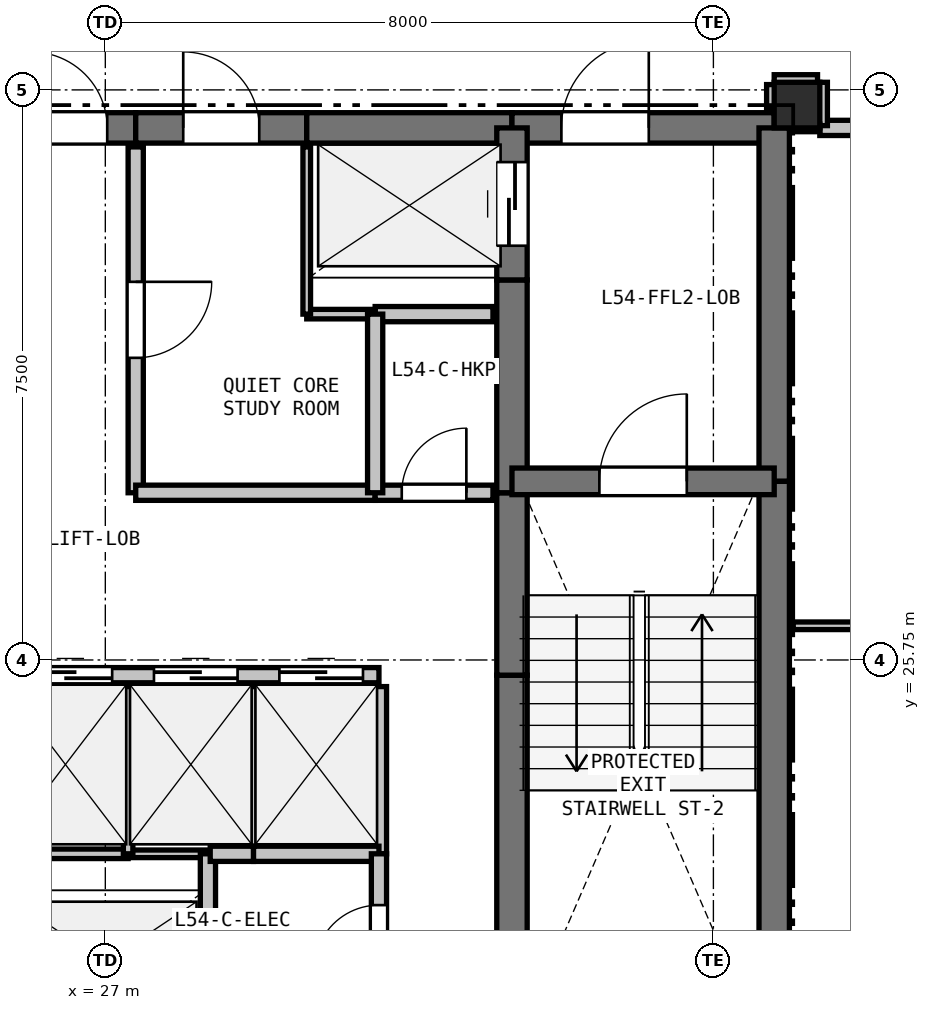
"""IFC4 building model, lengths in metres.
Left out: names, types, materials, properties, quantities, classifications, styles, units other than length and angle.
Written with IfcOpenShell. Run it as: python <this file> out.ifc"""

import sys

from ifc_helpers import new_model, si_unit, direction, frame, frame_2d, origin, origin_2d, place, context, subcontext, project, spatial, rectangle, extrude, element, fill, save


model = new_model("IFC4")
c1 = context("Model", 3, precision=1e-05, world=origin(), true_north=direction((0.0, 1.0)))
c2 = subcontext(c1, "Body", "Model", "MODEL_VIEW")
j1 = project(units=[si_unit("LENGTHUNIT", "METRE"), si_unit("PLANEANGLEUNIT", "RADIAN")], contexts=[c1])
p1 = place(None, origin())
s1 = spatial("IfcSite", under=j1, at=p1, CompositionType="ELEMENT")
p2 = place(p1, origin())
s2 = spatial("IfcBuilding", under=s1, at=p2, CompositionType="ELEMENT")
p3 = place(p2, frame((0.0, 0.0, 195.3)))
s3 = spatial("IfcBuildingStorey", under=s2, at=p3, CompositionType="ELEMENT", Elevation=195.3)
p4 = place(p3, frame((36.1, 33.05, 0.0), z_axis=(0.0, 0.0, 1.0), x_axis=(1.0, 0.0, 0.0)))
e1 = element("IfcColumn", 1, at=p4, inside=s3, PredefinedType="COLUMN", context=c2, shape_type="SweptSolid", body=[
    extrude(rectangle(XDim=0.6, YDim=0.6, at=origin_2d()), origin(), (0.0, 0.0, 1.0), 3.3),
])
p5 = place(p3, frame((25.65, 32.75, 0.0), z_axis=(0.0, 0.0, 1.0), x_axis=(1.0, 0.0, 0.0)))
e2 = element("IfcWall", 2, at=p5, inside=s3, PredefinedType="SHEAR", context=c2, shape_type="SweptSolid", body=[
    extrude(rectangle(XDim=1.75, YDim=0.4, at=frame_2d((0.875, 0.0))), origin(), (0.0, 0.0, 1.0), 3.07),
])
p6 = place(p5, frame((0.375, 0.0, 0.0)))
e3 = element("IfcOpeningElement", 3, at=p6, cuts=e2, PredefinedType="OPENING", context=c2, shape_type="SweptSolid", body=[
    extrude(rectangle(XDim=1.0, YDim=2.15, at=frame_2d((0.5, 1.075))), frame((0.0, 0.21, 0.0), z_axis=(0.0, -1.0, 0.0), x_axis=(1.0, 0.0, 0.0)), (0.0, 0.0, 1.0), 0.42),
])
p7 = place(p3, frame((27.4, 32.75, 0.0), z_axis=(0.0, 0.0, 1.0), x_axis=(1.0, 0.0, 0.0)))
e4 = element("IfcWall", 4, at=p7, inside=s3, PredefinedType="SHEAR", context=c2, shape_type="SweptSolid", body=[
    extrude(rectangle(XDim=2.25, YDim=0.4, at=frame_2d((1.125, 0.0))), origin(), (0.0, 0.0, 1.0), 3.07),
])
p8 = place(p7, frame((0.625, 0.0, 0.0)))
e5 = element("IfcOpeningElement", 5, at=p8, cuts=e4, PredefinedType="OPENING", context=c2, shape_type="SweptSolid", body=[
    extrude(rectangle(XDim=1.0, YDim=2.15, at=frame_2d((0.5, 1.075))), frame((0.0, 0.21, 0.0), z_axis=(0.0, -1.0, 0.0), x_axis=(1.0, 0.0, 0.0)), (0.0, 0.0, 1.0), 0.42),
])
p9 = place(p3, frame((29.65, 32.75, 0.0), z_axis=(0.0, 0.0, 1.0), x_axis=(1.0, 0.0, 0.0)))
e6 = element("IfcWall", 6, at=p9, inside=s3, PredefinedType="SHEAR", context=c2, shape_type="SweptSolid", body=[
    extrude(rectangle(XDim=2.7, YDim=0.4, at=frame_2d((1.35, 0.0))), origin(), (0.0, 0.0, 1.0), 3.07),
])
p10 = place(p3, frame((32.35, 32.75, 0.0), z_axis=(0.0, 0.0, 1.0), x_axis=(1.0, 0.0, 0.0)))
e7 = element("IfcWall", 7, at=p10, inside=s3, PredefinedType="SHEAR", context=c2, shape_type="SweptSolid", body=[
    extrude(rectangle(XDim=3.45, YDim=0.4, at=frame_2d((1.725, 0.0))), origin(), (0.0, 0.0, 1.0), 3.07),
])
p11 = place(p10, frame((0.65, 0.0, 0.0)))
e8 = element("IfcOpeningElement", 8, at=p11, cuts=e7, PredefinedType="OPENING", context=c2, shape_type="SweptSolid", body=[
    extrude(rectangle(XDim=1.15, YDim=2.15, at=frame_2d((0.575, 1.075))), frame((0.0, 0.21, 0.0), z_axis=(0.0, -1.0, 0.0), x_axis=(1.0, 0.0, 0.0)), (0.0, 0.0, 1.0), 0.42),
])
p12 = place(p3, frame((35.8, 32.75, 0.0), z_axis=(0.0, 0.0, 1.0), x_axis=(0.0, -1.0, 0.0)))
e9 = element("IfcWall", 9, at=p12, inside=s3, PredefinedType="SHEAR", context=c2, shape_type="SweptSolid", body=[
    extrude(rectangle(XDim=4.65, YDim=0.4, at=frame_2d((2.325, 0.0))), origin(), (0.0, 0.0, 1.0), 3.07),
])
p13 = place(p3, frame((35.8, 28.1, 0.0), z_axis=(0.0, 0.0, 1.0), x_axis=(0.0, -1.0, 0.0)))
e10 = element("IfcWall", 10, at=p13, inside=s3, PredefinedType="SHEAR", context=c2, shape_type="SweptSolid", body=[
    extrude(rectangle(XDim=7.35, YDim=0.4, at=frame_2d((3.675, 0.0))), origin(), (0.0, 0.0, 1.0), 3.07),
])
p14 = place(p3, frame((32.35, 20.75, 0.0), z_axis=(0.0, 0.0, 1.0), x_axis=(0.0, 1.0, 0.0)))
e11 = element("IfcWall", 11, at=p14, inside=s3, PredefinedType="SHEAR", context=c2, shape_type="SweptSolid", body=[
    extrude(rectangle(XDim=4.8, YDim=0.4, at=frame_2d((2.4, 0.0))), origin(), (0.0, 0.0, 1.0), 3.07),
])
p15 = place(p3, frame((32.35, 25.55, 0.0), z_axis=(0.0, 0.0, 1.0), x_axis=(0.0, 1.0, 0.0)))
e12 = element("IfcWall", 12, at=p15, inside=s3, PredefinedType="SHEAR", context=c2, shape_type="SweptSolid", body=[
    extrude(rectangle(XDim=2.4, YDim=0.4, at=frame_2d((1.2, 0.0))), origin(), (0.0, 0.0, 1.0), 3.07),
])
p16 = place(p3, frame((32.35, 27.95, 0.0), z_axis=(0.0, 0.0, 1.0), x_axis=(0.0, 1.0, 0.0)))
e13 = element("IfcWall", 13, at=p16, inside=s3, PredefinedType="SHEAR", context=c2, shape_type="SweptSolid", body=[
    extrude(rectangle(XDim=2.8, YDim=0.4, at=frame_2d((1.4, 0.0))), origin(), (0.0, 0.0, 1.0), 3.07),
])
p17 = place(p3, frame((32.35, 30.75, 0.0), z_axis=(0.0, 0.0, 1.0), x_axis=(0.0, 1.0, 0.0)))
e14 = element("IfcWall", 14, at=p17, inside=s3, PredefinedType="SHEAR", context=c2, shape_type="SweptSolid", body=[
    extrude(rectangle(XDim=2.0, YDim=0.4, at=frame_2d((1.0, 0.0))), origin(), (0.0, 0.0, 1.0), 3.07),
])
p18 = place(p17, frame((0.45, 0.0, 0.0)))
e15 = element("IfcOpeningElement", 15, at=p18, cuts=e14, PredefinedType="OPENING", context=c2, shape_type="SweptSolid", body=[
    extrude(rectangle(XDim=1.1, YDim=2.15, at=frame_2d((0.55, 1.075))), frame((0.0, 0.21, 0.0), z_axis=(0.0, -1.0, 0.0), x_axis=(1.0, 0.0, 0.0)), (0.0, 0.0, 1.0), 0.42),
])
p19 = place(p3, frame((32.35, 28.1, 0.0), z_axis=(0.0, 0.0, 1.0), x_axis=(1.0, 0.0, 0.0)))
e16 = element("IfcWall", 16, at=p19, inside=s3, PredefinedType="SHEAR", context=c2, shape_type="SweptSolid", body=[
    extrude(rectangle(XDim=3.45, YDim=0.35, at=frame_2d((1.725, 0.0))), origin(), (0.0, 0.0, 1.0), 3.07),
])
p20 = place(p19, frame((1.15, 0.0, 0.0)))
e17 = element("IfcOpeningElement", 17, at=p20, cuts=e16, PredefinedType="OPENING", context=c2, shape_type="SweptSolid", body=[
    extrude(rectangle(XDim=1.15, YDim=2.15, at=frame_2d((0.575, 1.075))), frame((0.0, 0.185, 0.0), z_axis=(0.0, -1.0, 0.0), x_axis=(1.0, 0.0, 0.0)), (0.0, 0.0, 1.0), 0.37),
])
p21 = place(p3, frame((25.65, 25.55, 0.0), z_axis=(0.0, 0.0, 1.0), x_axis=(1.0, 0.0, 0.0)))
e18 = element("IfcWall", 18, at=p21, inside=s3, PredefinedType="PARTITIONING", context=c2, shape_type="SweptSolid", body=[
    extrude(rectangle(XDim=4.95, YDim=0.2, at=frame_2d((2.475, 0.0))), origin(), (0.0, 0.0, 1.0), 3.07),
])
p22 = place(p21, frame((0.34, 0.0, 0.0)))
e19 = element("IfcOpeningElement", 19, at=p22, cuts=e18, PredefinedType="OPENING", context=c2, shape_type="SweptSolid", body=[
    extrude(rectangle(XDim=1.1, YDim=2.15, at=frame_2d((0.55, 1.075))), frame((0.0, 0.11, 0.0), z_axis=(0.0, -1.0, 0.0), x_axis=(1.0, 0.0, 0.0)), (0.0, 0.0, 1.0), 0.22),
])
p23 = place(p21, frame((1.99, 0.0, 0.0)))
e20 = element("IfcOpeningElement", 20, at=p23, cuts=e18, PredefinedType="OPENING", context=c2, shape_type="SweptSolid", body=[
    extrude(rectangle(XDim=1.1, YDim=2.15, at=frame_2d((0.55, 1.075))), frame((0.0, 0.11, 0.0), z_axis=(0.0, -1.0, 0.0), x_axis=(1.0, 0.0, 0.0)), (0.0, 0.0, 1.0), 0.22),
])
p24 = place(p21, frame((3.64, 0.0, 0.0)))
e21 = element("IfcOpeningElement", 21, at=p24, cuts=e18, PredefinedType="OPENING", context=c2, shape_type="SweptSolid", body=[
    extrude(rectangle(XDim=1.1, YDim=2.15, at=frame_2d((0.55, 1.075))), frame((0.0, 0.11, 0.0), z_axis=(0.0, -1.0, 0.0), x_axis=(1.0, 0.0, 0.0)), (0.0, 0.0, 1.0), 0.22),
])
p25 = place(p3, frame((25.9, 23.2, 0.0), z_axis=(0.0, 0.0, 1.0), x_axis=(1.0, 0.0, 0.0)))
e22 = element("IfcWall", 22, at=p25, inside=s3, PredefinedType="PARTITIONING", context=c2, shape_type="SweptSolid", body=[
    extrude(rectangle(XDim=1.4, YDim=0.125, at=frame_2d((0.7, 0.0))), origin(), (0.0, 0.0, 1.0), 3.07),
])
p26 = place(p3, frame((27.3, 23.2, 0.0), z_axis=(0.0, 0.0, 1.0), x_axis=(1.0, 0.0, 0.0)))
e23 = element("IfcWall", 23, at=p26, inside=s3, PredefinedType="PARTITIONING", context=c2, shape_type="SweptSolid", body=[
    extrude(rectangle(XDim=1.05, YDim=0.1, at=frame_2d((0.525, 0.0))), origin(), (0.0, 0.0, 1.0), 3.07),
])
p27 = place(p3, frame((28.35, 23.2, 0.0), z_axis=(0.0, 0.0, 1.0), x_axis=(0.0, -1.0, 0.0)))
e24 = element("IfcWall", 24, at=p27, inside=s3, PredefinedType="PARTITIONING", context=c2, shape_type="SweptSolid", body=[
    extrude(rectangle(XDim=2.2, YDim=0.2, at=frame_2d((1.1, 0.0))), origin(), (0.0, 0.0, 1.0), 3.07),
])
p28 = place(p3, frame((32.1, 30.3, 0.0), z_axis=(0.0, 0.0, 1.0), x_axis=(-1.0, 0.0, 0.0)))
e25 = element("IfcWall", 25, at=p28, inside=s3, PredefinedType="PARTITIONING", context=c2, shape_type="SweptSolid", body=[
    extrude(rectangle(XDim=1.55, YDim=0.2, at=frame_2d((0.775, 0.0))), origin(), (0.0, 0.0, 1.0), 3.07),
])
p29 = place(p3, frame((30.55, 30.3, 0.0), z_axis=(0.0, 0.0, 1.0), x_axis=(-1.0, 0.0, 0.0)))
e26 = element("IfcWall", 26, at=p29, inside=s3, PredefinedType="PARTITIONING", context=c2, shape_type="SweptSolid", body=[
    extrude(rectangle(XDim=0.9, YDim=0.125, at=frame_2d((0.45, 0.0))), origin(), (0.0, 0.0, 1.0), 3.07),
])
p30 = place(p3, frame((29.65, 30.3, 0.0), z_axis=(0.0, 0.0, 1.0), x_axis=(0.0, 1.0, 0.0)))
e27 = element("IfcWall", 27, at=p30, inside=s3, PredefinedType="PARTITIONING", context=c2, shape_type="SweptSolid", body=[
    extrude(rectangle(XDim=2.2, YDim=0.1, at=frame_2d((1.1, 0.0))), origin(), (0.0, 0.0, 1.0), 3.07),
])
p31 = place(p3, frame((27.3, 25.4, 0.0), z_axis=(0.0, 0.0, 1.0), x_axis=(0.0, -1.0, 0.0)))
e28 = element("IfcWall", 28, at=p31, inside=s3, PredefinedType="PARTITIONING", context=c2, shape_type="SweptSolid", body=[
    extrude(rectangle(XDim=2.2, YDim=0.125, at=frame_2d((1.1, 0.0))), origin(), (0.0, 0.0, 1.0), 3.07),
])
p32 = place(p3, frame((28.95, 25.4, 0.0), z_axis=(0.0, 0.0, 1.0), x_axis=(0.0, -1.0, 0.0)))
e29 = element("IfcWall", 29, at=p32, inside=s3, PredefinedType="PARTITIONING", context=c2, shape_type="SweptSolid", body=[
    extrude(rectangle(XDim=2.2, YDim=0.1, at=frame_2d((1.1, 0.0))), origin(), (0.0, 0.0, 1.0), 3.07),
])
p33 = place(p3, frame((28.95, 23.2, 0.0), z_axis=(0.0, 0.0, 1.0), x_axis=(-1.0, 0.0, 0.0)))
e30 = element("IfcWall", 30, at=p33, inside=s3, PredefinedType="PARTITIONING", context=c2, shape_type="SweptSolid", body=[
    extrude(rectangle(XDim=0.57, YDim=0.2, at=frame_2d((0.285, 0.0))), origin(), (0.0, 0.0, 1.0), 3.07),
])
p34 = place(p3, frame((30.6, 25.4, 0.0), z_axis=(0.0, 0.0, 1.0), x_axis=(0.0, -1.0, 0.0)))
e31 = element("IfcWall", 31, at=p34, inside=s3, PredefinedType="PARTITIONING", context=c2, shape_type="SweptSolid", body=[
    extrude(rectangle(XDim=2.2, YDim=0.2, at=frame_2d((1.1, 0.0))), origin(), (0.0, 0.0, 1.0), 3.07),
])
p35 = place(p3, frame((30.6, 23.2, 0.0), z_axis=(0.0, 0.0, 1.0), x_axis=(-1.0, 0.0, 0.0)))
e32 = element("IfcWall", 32, at=p35, inside=s3, PredefinedType="PARTITIONING", context=c2, shape_type="SweptSolid", body=[
    extrude(rectangle(XDim=1.65, YDim=0.2, at=frame_2d((0.825, 0.0))), origin(), (0.0, 0.0, 1.0), 3.07),
])
p36 = place(p3, frame((30.6, 21.0, 0.0), z_axis=(0.0, 0.0, 1.0), x_axis=(0.0, 1.0, 0.0)))
e33 = element("IfcWall", 33, at=p36, inside=s3, PredefinedType="PARTITIONING", context=c2, shape_type="SweptSolid", body=[
    extrude(rectangle(XDim=2.2, YDim=0.2, at=frame_2d((1.1, 0.0))), origin(), (0.0, 0.0, 1.0), 3.07),
])
p37 = place(p36, frame((0.675, 0.0, 0.0)))
e34 = element("IfcOpeningElement", 34, at=p37, cuts=e33, PredefinedType="OPENING", context=c2, shape_type="SweptSolid", body=[
    extrude(rectangle(XDim=0.85, YDim=2.1, at=frame_2d((0.425, 1.05))), frame((0.0, 0.11, 0.0), z_axis=(0.0, -1.0, 0.0), x_axis=(1.0, 0.0, 0.0)), (0.0, 0.0, 1.0), 0.22),
])
p38 = place(p3, frame((27.4, 32.5, 0.0), z_axis=(0.0, 0.0, 1.0), x_axis=(0.0, -1.0, 0.0)))
e35 = element("IfcWall", 35, at=p38, inside=s3, PredefinedType="PARTITIONING", context=c2, shape_type="SweptSolid", body=[
    extrude(rectangle(XDim=4.55, YDim=0.2, at=frame_2d((2.275, 0.0))), origin(), (0.0, 0.0, 1.0), 3.07),
])
p39 = place(p38, frame((1.775, 0.0, 0.0)))
e36 = element("IfcOpeningElement", 36, at=p39, cuts=e35, PredefinedType="OPENING", context=c2, shape_type="SweptSolid", body=[
    extrude(rectangle(XDim=1.0, YDim=2.15, at=frame_2d((0.5, 1.075))), frame((0.0, 0.11, 0.0), z_axis=(0.0, -1.0, 0.0), x_axis=(1.0, 0.0, 0.0)), (0.0, 0.0, 1.0), 0.22),
])
p40 = place(p3, frame((27.4, 27.95, 0.0), z_axis=(0.0, 0.0, 1.0), x_axis=(1.0, 0.0, 0.0)))
e37 = element("IfcWall", 37, at=p40, inside=s3, PredefinedType="PARTITIONING", context=c2, shape_type="SweptSolid", body=[
    extrude(rectangle(XDim=3.15, YDim=0.2, at=frame_2d((1.575, 0.0))), origin(), (0.0, 0.0, 1.0), 3.07),
])
p41 = place(p3, frame((30.55, 27.95, 0.0), z_axis=(0.0, 0.0, 1.0), x_axis=(1.0, 0.0, 0.0)))
e38 = element("IfcWall", 38, at=p41, inside=s3, PredefinedType="PARTITIONING", context=c2, shape_type="SweptSolid", body=[
    extrude(rectangle(XDim=1.55, YDim=0.2, at=frame_2d((0.775, 0.0))), origin(), (0.0, 0.0, 1.0), 3.07),
])
p42 = place(p41, frame((0.35, 0.0, 0.0)))
e39 = element("IfcOpeningElement", 39, at=p42, cuts=e38, PredefinedType="OPENING", context=c2, shape_type="SweptSolid", body=[
    extrude(rectangle(XDim=0.85, YDim=2.1, at=frame_2d((0.425, 1.05))), frame((0.0, 0.11, 0.0), z_axis=(0.0, -1.0, 0.0), x_axis=(1.0, 0.0, 0.0)), (0.0, 0.0, 1.0), 0.22),
])
p43 = place(p3, frame((39.2, 32.75, 0.0), z_axis=(0.0, 0.0, 1.0), x_axis=(-1.0, 0.0, 0.0)))
e40 = element("IfcWall", 40, at=p43, inside=s3, PredefinedType="PARTITIONING", context=c2, shape_type="SweptSolid", body=[
    extrude(rectangle(XDim=2.8, YDim=0.2, at=frame_2d((1.4, 0.0))), origin(), (0.0, 0.0, 1.0), 3.07),
])
p44 = place(p43, frame((0.9, 0.0, 0.0)))
e41 = element("IfcOpeningElement", 41, at=p44, cuts=e40, PredefinedType="OPENING", context=c2, shape_type="SweptSolid", body=[
    extrude(rectangle(XDim=1.0, YDim=2.15, at=frame_2d((0.5, 1.075))), frame((0.0, 0.11, 0.0), z_axis=(0.0, -1.0, 0.0), x_axis=(1.0, 0.0, 0.0)), (0.0, 0.0, 1.0), 0.22),
])
for number, where, z_axis, x_axis in (
    (42, (36.4, 32.78, 0.0), (0.0, 0.0, 1.0), (0.0, 1.0, 0.0)),
    (43, (36.37, 33.35, 0.0), (0.0, 0.0, 1.0), (-1.0, 0.0, 0.0)),
):
    element("IfcWall", number, at=place(p3, frame(where, z_axis=z_axis, x_axis=x_axis)), inside=s3, PredefinedType="PARTITIONING", context=c2, shape_type="SweptSolid", body=[
        extrude(rectangle(XDim=0.57, YDim=0.2, at=frame_2d((0.285, 0.0))), origin(), (0.0, 0.0, 1.0), 2.518),
    ])
p45 = place(p3, frame((35.8, 33.32, 0.0), z_axis=(0.0, 0.0, 1.0), x_axis=(0.0, -1.0, 0.0)))
e44 = element("IfcWall", 44, at=p45, inside=s3, PredefinedType="PARTITIONING", context=c2, shape_type="SweptSolid", body=[
    extrude(rectangle(XDim=0.32, YDim=0.2, at=frame_2d((0.16, 0.0))), origin(), (0.0, 0.0, 1.0), 2.595),
])
p46 = place(p3, frame((30.55, 30.3, 0.0), z_axis=(0.0, 0.0, 1.0), x_axis=(0.0, -1.0, 0.0)))
e45 = element("IfcWall", 45, at=p46, inside=s3, PredefinedType="PARTITIONING", context=c2, shape_type="SweptSolid", body=[
    extrude(rectangle(XDim=2.35, YDim=0.2, at=frame_2d((1.175, 0.0))), origin(), (0.0, 0.0, 1.0), 3.07),
])
p47 = place(p3, frame((36.05, 32.75, 0.0), z_axis=(0.0, 0.0, 1.0), x_axis=(1.0, 0.0, 0.0)))
e46 = element("IfcWall", 46, at=p47, inside=s3, PredefinedType="PARTITIONING", context=c2, shape_type="SweptSolid", body=[
    extrude(rectangle(XDim=0.35, YDim=0.1, at=frame_2d((0.175, 0.0))), origin(), (0.0, 0.0, 1.0), 2.595),
])
p48 = place(p3, frame((40.55, 26.2, 0.0), z_axis=(0.0, 0.0, 1.0), x_axis=(-1.0, 0.0, 0.0)))
e47 = element("IfcWall", 47, at=p48, inside=s3, PredefinedType="PARTITIONING", context=c2, shape_type="SweptSolid", body=[
    extrude(rectangle(XDim=4.5, YDim=0.1, at=frame_2d((2.25, 0.0))), origin(), (0.0, 0.0, 1.0), 2.365),
])
p49 = place(p22, origin())
e48 = element("IfcDoor", 48, at=p49, inside=s3, OperationType="SLIDING_TO_LEFT", PredefinedType="DOOR", context=c2, shape_type="SweptSolid", body=[
    extrude(rectangle(XDim=1.1, YDim=2.15, at=frame_2d((0.55, 1.075))), frame((0.0, 0.025, 0.0), z_axis=(0.0, -1.0, 0.0), x_axis=(1.0, 0.0, 0.0)), (0.0, 0.0, 1.0), 0.05),
])
fill(e19, e48)
p50 = place(p23, origin())
e49 = element("IfcDoor", 49, at=p50, inside=s3, OperationType="SLIDING_TO_LEFT", PredefinedType="DOOR", context=c2, shape_type="SweptSolid", body=[
    extrude(rectangle(XDim=1.1, YDim=2.15, at=frame_2d((0.55, 1.075))), frame((0.0, 0.025, 0.0), z_axis=(0.0, -1.0, 0.0), x_axis=(1.0, 0.0, 0.0)), (0.0, 0.0, 1.0), 0.05),
])
fill(e20, e49)
p51 = place(p24, origin())
e50 = element("IfcDoor", 50, at=p51, inside=s3, OperationType="SLIDING_TO_LEFT", PredefinedType="DOOR", context=c2, shape_type="SweptSolid", body=[
    extrude(rectangle(XDim=1.1, YDim=2.15, at=frame_2d((0.55, 1.075))), frame((0.0, 0.025, 0.0), z_axis=(0.0, -1.0, 0.0), x_axis=(1.0, 0.0, 0.0)), (0.0, 0.0, 1.0), 0.05),
])
fill(e21, e50)
p52 = place(p6, origin())
e51 = element("IfcDoor", 51, at=p52, inside=s3, OperationType="SINGLE_SWING_LEFT", PredefinedType="DOOR", context=c2, shape_type="SweptSolid", body=[
    extrude(rectangle(XDim=1.0, YDim=2.15, at=frame_2d((0.5, 1.075))), frame((0.0, 0.025, 0.0), z_axis=(0.0, -1.0, 0.0), x_axis=(1.0, 0.0, 0.0)), (0.0, 0.0, 1.0), 0.05),
])
fill(e3, e51)
p53 = place(p18, origin())
e52 = element("IfcDoor", 52, at=p53, inside=s3, OperationType="SLIDING_TO_LEFT", PredefinedType="DOOR", context=c2, shape_type="SweptSolid", body=[
    extrude(rectangle(XDim=1.1, YDim=2.15, at=frame_2d((0.55, 1.075))), frame((0.0, 0.025, 0.0), z_axis=(0.0, -1.0, 0.0), x_axis=(1.0, 0.0, 0.0)), (0.0, 0.0, 1.0), 0.05),
])
fill(e15, e52)
p54 = place(p20, origin())
e53 = element("IfcDoor", 53, at=p54, inside=s3, OperationType="SINGLE_SWING_RIGHT", PredefinedType="DOOR", context=c2, shape_type="SweptSolid", body=[
    extrude(rectangle(XDim=1.15, YDim=2.15, at=frame_2d((0.575, 1.075))), frame((0.0, 0.025, 0.0), z_axis=(0.0, -1.0, 0.0), x_axis=(1.0, 0.0, 0.0)), (0.0, 0.0, 1.0), 0.05),
])
fill(e17, e53)
p55 = place(p11, origin())
e54 = element("IfcDoor", 54, at=p55, inside=s3, OperationType="SINGLE_SWING_RIGHT", PredefinedType="DOOR", context=c2, shape_type="SweptSolid", body=[
    extrude(rectangle(XDim=1.15, YDim=2.15, at=frame_2d((0.575, 1.075))), frame((0.0, 0.025, 0.0), z_axis=(0.0, -1.0, 0.0), x_axis=(1.0, 0.0, 0.0)), (0.0, 0.0, 1.0), 0.05),
])
fill(e8, e54)
p56 = place(p39, origin())
e55 = element("IfcDoor", 55, at=p56, inside=s3, OperationType="SINGLE_SWING_LEFT", PredefinedType="DOOR", context=c2, shape_type="SweptSolid", body=[
    extrude(rectangle(XDim=1.0, YDim=2.15, at=frame_2d((0.5, 1.075))), frame((0.0, 0.025, 0.0), z_axis=(0.0, -1.0, 0.0), x_axis=(1.0, 0.0, 0.0)), (0.0, 0.0, 1.0), 0.05),
])
fill(e36, e55)
p57 = place(p42, origin())
e56 = element("IfcDoor", 56, at=p57, inside=s3, OperationType="SINGLE_SWING_RIGHT", PredefinedType="DOOR", context=c2, shape_type="SweptSolid", body=[
    extrude(rectangle(XDim=0.85, YDim=2.1, at=frame_2d((0.425, 1.05))), frame((0.0, 0.025, 0.0), z_axis=(0.0, -1.0, 0.0), x_axis=(1.0, 0.0, 0.0)), (0.0, 0.0, 1.0), 0.05),
])
fill(e39, e56)
p58 = place(p37, origin())
e57 = element("IfcDoor", 57, at=p58, inside=s3, OperationType="SINGLE_SWING_LEFT", PredefinedType="DOOR", context=c2, shape_type="SweptSolid", body=[
    extrude(rectangle(XDim=0.85, YDim=2.1, at=frame_2d((0.425, 1.05))), frame((0.0, 0.025, 0.0), z_axis=(0.0, -1.0, 0.0), x_axis=(1.0, 0.0, 0.0)), (0.0, 0.0, 1.0), 0.05),
])
fill(e34, e57)
p59 = place(p8, origin())
e58 = element("IfcDoor", 58, at=p59, inside=s3, OperationType="SINGLE_SWING_LEFT", PredefinedType="DOOR", context=c2, shape_type="SweptSolid", body=[
    extrude(rectangle(XDim=1.0, YDim=2.15, at=frame_2d((0.5, 1.075))), frame((0.0, 0.025, 0.0), z_axis=(0.0, -1.0, 0.0), x_axis=(1.0, 0.0, 0.0)), (0.0, 0.0, 1.0), 0.05),
])
fill(e5, e58)
save(model, sys.argv[1])
